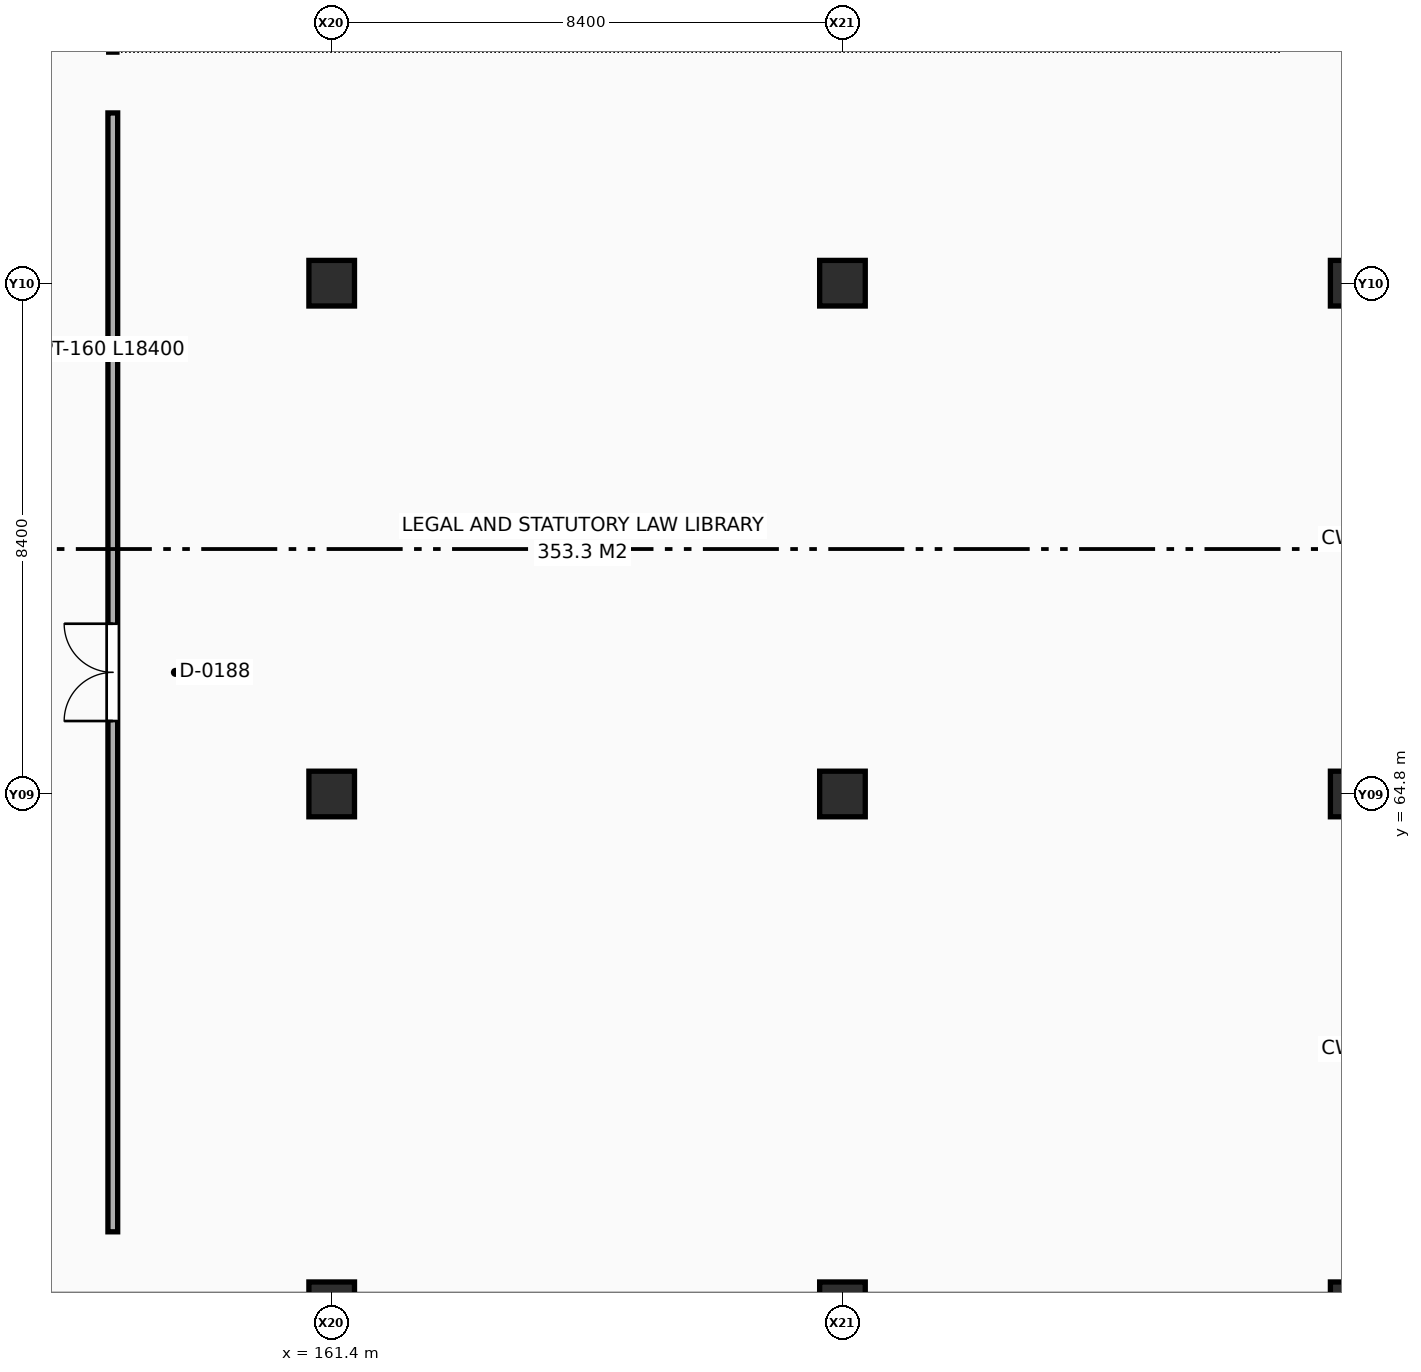
"""IFC4 building model, lengths in metres.
Left out: names, types, materials, properties, quantities, classifications, styles, units other than length and angle.
Written with IfcOpenShell. Run it as: python <this file> out.ifc"""

import sys

from ifc_helpers import new_model, si_unit, direction, frame, frame_2d, origin, origin_2d, place, context, subcontext, project, spatial, rectangle, extrude, element, fill, save


model = new_model("IFC4")
c1 = context("Model", 3, precision=1e-05, world=origin(), true_north=direction((0.0, 1.0)))
c2 = subcontext(c1, "Body", "Model", "MODEL_VIEW")
j1 = project(units=[si_unit("LENGTHUNIT", "METRE"), si_unit("PLANEANGLEUNIT", "RADIAN")], contexts=[c1])
p1 = place(None, origin())
s1 = spatial("IfcSite", under=j1, at=p1, CompositionType="ELEMENT")
p2 = place(p1, origin())
s2 = spatial("IfcBuilding", under=s1, at=p2, CompositionType="ELEMENT")
p3 = place(p2, frame((0.0, 0.0, 5.4)))
s3 = spatial("IfcBuildingStorey", under=s2, at=p3, CompositionType="ELEMENT", Elevation=5.4)
for number, where, z_axis, x_axis in (
    (1, (161.4, 56.4, 0.0), (0.0, 0.0, 1.0), (1.0, 0.0, 0.0)),
    (2, (161.4, 64.8, 0.0), (0.0, 0.0, 1.0), (1.0, 0.0, 0.0)),
    (3, (161.4, 73.2, 0.0), (0.0, 0.0, 1.0), (1.0, 0.0, 0.0)),
    (4, (169.8, 56.4, 0.0), (0.0, 0.0, 1.0), (1.0, 0.0, 0.0)),
    (5, (169.8, 64.8, 0.0), (0.0, 0.0, 1.0), (1.0, 0.0, 0.0)),
    (6, (169.8, 73.2, 0.0), (0.0, 0.0, 1.0), (1.0, 0.0, 0.0)),
    (7, (178.2, 56.4, 0.0), (0.0, 0.0, 1.0), (1.0, 0.0, 0.0)),
    (8, (178.2, 64.8, 0.0), (0.0, 0.0, 1.0), (1.0, 0.0, 0.0)),
    (9, (178.2, 73.2, 0.0), (0.0, 0.0, 1.0), (1.0, 0.0, 0.0)),
):
    element("IfcColumn", number, at=place(p3, frame(where, z_axis=z_axis, x_axis=x_axis)), inside=s3, PredefinedType="COLUMN", context=c2, shape_type="SweptSolid", body=[
        extrude(rectangle(XDim=0.75, YDim=0.75, at=origin_2d()), origin(), (0.0, 0.0, 1.0), 4.2),
    ])
p4 = place(p3, frame((157.8, 57.6, 0.0), z_axis=(0.0, 0.0, 1.0), x_axis=(0.0, 1.0, 0.0)))
e10 = element("IfcWall", 10, at=p4, inside=s3, PredefinedType="PARTITIONING", context=c2, shape_type="SweptSolid", body=[
    extrude(rectangle(XDim=18.4, YDim=0.16, at=frame_2d((9.2, 0.0))), origin(), (0.0, 0.0, 1.0), 3.86),
])
p5 = place(p4, frame((8.4, 0.0, 0.0)))
e11 = element("IfcOpeningElement", 11, at=p5, cuts=e10, PredefinedType="OPENING", context=c2, shape_type="SweptSolid", body=[
    extrude(rectangle(XDim=1.6, YDim=2.3, at=frame_2d((0.8, 1.15))), frame((0.0, 0.09, 0.0), z_axis=(0.0, -1.0, 0.0), x_axis=(1.0, 0.0, 0.0)), (0.0, 0.0, 1.0), 0.18),
])
p6 = place(p5, origin())
e12 = element("IfcDoor", 12, at=p6, inside=s3, OperationType="DOUBLE_DOOR_SINGLE_SWING", PredefinedType="DOOR", context=c2, shape_type="SweptSolid", body=[
    extrude(rectangle(XDim=1.6, YDim=2.3, at=frame_2d((0.8, 1.15))), frame((0.0, 0.025, 0.0), z_axis=(0.0, -1.0, 0.0), x_axis=(1.0, 0.0, 0.0)), (0.0, 0.0, 1.0), 0.05),
])
fill(e11, e12)
save(model, sys.argv[1])
